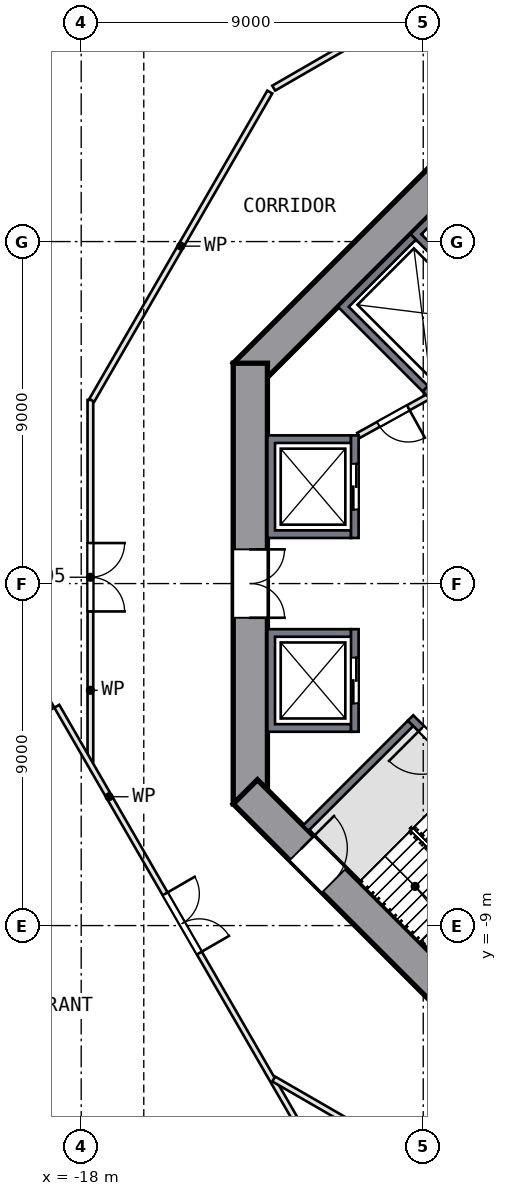
"""IFC4 building model, lengths in metres.
Left out: names, types, materials, properties, quantities, classifications, styles, units other than length and angle.
Written with IfcOpenShell. Run it as: python <this file> out.ifc"""

import sys

from ifc_helpers import new_model, si_unit, direction, frame, frame_2d, origin, place, context, subcontext, project, spatial, polyline, rectangle, outline, extrude, element, fill, save


model = new_model("IFC4")
c1 = context("Model", 3, precision=1e-05, world=origin(), true_north=direction((0.0, 1.0)))
c2 = subcontext(c1, "Body", "Model", "MODEL_VIEW")
j1 = project(units=[si_unit("LENGTHUNIT", "METRE"), si_unit("PLANEANGLEUNIT", "RADIAN")], contexts=[c1])
p1 = place(None, origin())
s1 = spatial("IfcSite", under=j1, at=p1, CompositionType="ELEMENT")
p2 = place(p1, origin())
s2 = spatial("IfcBuilding", under=s1, at=p2, CompositionType="ELEMENT")
p3 = place(p2, frame((0.0, 0.0, 8.0)))
s3 = spatial("IfcBuildingStorey", under=s2, at=p3, CompositionType="ELEMENT", Elevation=8.0)
p4 = place(p3, frame((-5.481, 13.682, 0.0), z_axis=(0.0, 0.0, 1.0), x_axis=(-0.707106781, -0.707106781, 0.0)))
e1 = element("IfcWall", 1, at=p4, inside=s3, PredefinedType="SHEAR", context=c2, shape_type="SweptSolid", body=[
    extrude(rectangle(XDim=11.598, YDim=0.9, at=frame_2d((5.799, 0.0))), origin(), (0.0, 0.0, 1.0), 6.0),
])
p5 = place(p3, frame((-13.55, 5.799, 0.0), z_axis=(0.0, 0.0, 1.0), x_axis=(0.0, -1.0, 0.0)))
e2 = element("IfcWall", 2, at=p5, inside=s3, PredefinedType="SHEAR", context=c2, shape_type="SweptSolid", body=[
    extrude(rectangle(XDim=11.598, YDim=0.9, at=frame_2d((5.799, 0.0))), origin(), (0.0, 0.0, 1.0), 6.0),
])
p6 = place(p5, frame((4.899, 0.0, 0.0)))
e3 = element("IfcOpeningElement", 3, at=p6, cuts=e2, PredefinedType="OPENING", context=c2, shape_type="SweptSolid", body=[
    extrude(rectangle(XDim=1.8, YDim=2.1, at=frame_2d((0.9, 1.05))), frame((0.0, 0.46, 0.0), z_axis=(0.0, -1.0, 0.0), x_axis=(1.0, 0.0, 0.0)), (0.0, 0.0, 1.0), 0.92),
])
p7 = place(p3, frame((-13.682, -5.481, 0.0), z_axis=(0.0, 0.0, 1.0), x_axis=(0.707106781, -0.707106781, 0.0)))
e4 = element("IfcWall", 4, at=p7, inside=s3, PredefinedType="SHEAR", context=c2, shape_type="SweptSolid", body=[
    extrude(rectangle(XDim=11.598, YDim=0.9, at=frame_2d((5.799, 0.0))), origin(), (0.0, 0.0, 1.0), 6.0),
])
p8 = place(p7, frame((2.099, 0.0, 0.0)))
e5 = element("IfcOpeningElement", 5, at=p8, cuts=e4, PredefinedType="OPENING", context=c2, shape_type="SweptSolid", body=[
    extrude(rectangle(XDim=1.2, YDim=2.1, at=frame_2d((0.6, 1.05))), frame((0.0, 0.46, 0.0), z_axis=(0.0, -1.0, 0.0), x_axis=(1.0, 0.0, 0.0)), (0.0, 0.0, 1.0), 0.92),
])
p9 = place(p3, frame((-17.777, 17.586, 0.0), z_axis=(0.0, 0.0, 1.0), x_axis=(-0.500006139, -0.866021859, 0.0)))
e6 = element("IfcWall", 6, at=p9, inside=s3, PredefinedType="SOLIDWALL", context=c2, shape_type="SweptSolid", body=[
    extrude(rectangle(XDim=12.962, YDim=0.14, at=frame_2d((6.481, 0.0))), origin(), (0.0, 0.0, 1.0), 5.55),
])
p10 = place(p9, frame((1.748, 0.0, 0.9)))
e7 = element("IfcOpeningElement", 7, at=p10, cuts=e6, PredefinedType="OPENING", context=c2, shape_type="SweptSolid", body=[
    extrude(rectangle(XDim=3.0, YDim=3.6, at=frame_2d((1.5, 1.8))), frame((0.0, 0.08, 0.0), z_axis=(0.0, -1.0, 0.0), x_axis=(1.0, 0.0, 0.0)), (0.0, 0.0, 1.0), 0.16),
])
p11 = place(p9, frame((7.935, 0.0, 0.9)))
e8 = element("IfcOpeningElement", 8, at=p11, cuts=e6, PredefinedType="OPENING", context=c2, shape_type="SweptSolid", body=[
    extrude(rectangle(XDim=3.0, YDim=3.6, at=frame_2d((1.5, 1.8))), frame((0.0, 0.08, 0.0), z_axis=(0.0, -1.0, 0.0), x_axis=(1.0, 0.0, 0.0)), (0.0, 0.0, 1.0), 0.16),
])
p12 = place(p3, origin())
e9 = element("IfcWall", 9, at=p12, inside=s3, PredefinedType="SOLIDWALL", context=c2, shape_type="SweptSolid", body=[
    extrude(outline(polyline([(-13.1, 3.9), (-10.9, 3.9), (-10.9, 3.7), (-12.9, 3.7), (-12.9, 1.4), (-10.9, 1.4), (-10.9, 1.2), (-13.1, 1.2), (-13.1, 3.9)])), origin(), (0.0, 0.0, 1.0), 5.55),
])
p13 = place(p3, frame((-10.8, 1.2, 0.0), z_axis=(0.0, 0.0, 1.0), x_axis=(0.0, 1.0, 0.0)))
e10 = element("IfcWall", 10, at=p13, inside=s3, PredefinedType="SOLIDWALL", context=c2, shape_type="SweptSolid", body=[
    extrude(rectangle(XDim=2.7, YDim=0.2, at=frame_2d((1.35, 0.0))), origin(), (0.0, 0.0, 1.0), 5.55),
])
p14 = place(p13, frame((0.75, 0.0, 0.0)))
e11 = element("IfcOpeningElement", 11, at=p14, cuts=e10, PredefinedType="OPENING", context=c2, shape_type="SweptSolid", body=[
    extrude(rectangle(XDim=1.2, YDim=2.1, at=frame_2d((0.6, 1.05))), frame((0.0, 0.11, 0.0), z_axis=(0.0, -1.0, 0.0), x_axis=(1.0, 0.0, 0.0)), (0.0, 0.0, 1.0), 0.22),
])
p15 = place(p3, origin())
e12 = element("IfcWall", 12, at=p15, inside=s3, PredefinedType="SOLIDWALL", context=c2, shape_type="SweptSolid", body=[
    extrude(outline(polyline([(-13.1, -3.9), (-13.1, -1.2), (-10.9, -1.2), (-10.9, -1.4), (-12.9, -1.4), (-12.9, -3.7), (-10.9, -3.7), (-10.9, -3.9), (-13.1, -3.9)])), origin(), (0.0, 0.0, 1.0), 5.55),
])
p16 = place(p3, frame((-10.8, -1.2, 0.0), z_axis=(0.0, 0.0, 1.0), x_axis=(0.0, -1.0, 0.0)))
e13 = element("IfcWall", 13, at=p16, inside=s3, PredefinedType="SOLIDWALL", context=c2, shape_type="SweptSolid", body=[
    extrude(rectangle(XDim=2.7, YDim=0.2, at=frame_2d((1.35, 0.0))), origin(), (0.0, 0.0, 1.0), 5.55),
])
p17 = place(p16, frame((0.75, 0.0, 0.0)))
e14 = element("IfcOpeningElement", 14, at=p17, cuts=e13, PredefinedType="OPENING", context=c2, shape_type="SweptSolid", body=[
    extrude(rectangle(XDim=1.2, YDim=2.1, at=frame_2d((0.6, 1.05))), frame((0.0, 0.11, 0.0), z_axis=(0.0, -1.0, 0.0), x_axis=(1.0, 0.0, 0.0)), (0.0, 0.0, 1.0), 0.22),
])
p18 = place(p3, origin())
e15 = element("IfcWall", 15, at=p18, inside=s3, PredefinedType="SOLIDWALL", context=c2, shape_type="SweptSolid", body=[
    extrude(outline(polyline([(-9.334, 9.192), (-7.283, 11.243), (-5.056, 9.016), (-5.197, 8.874), (-7.283, 10.96), (-9.051, 9.192), (-6.965, 7.106), (-7.106, 6.965), (-9.334, 9.192)])), origin(), (0.0, 0.0, 1.0), 5.55),
])
p19 = place(p3, origin())
e16 = element("IfcWall", 16, at=p19, inside=s3, PredefinedType="SOLIDWALL", context=c2, shape_type="SweptSolid", body=[
    extrude(outline(polyline([(-11.243, 7.283), (-9.334, 9.192), (-9.192, 9.051), (-10.96, 7.283), (-8.874, 5.197), (-9.016, 5.056), (-11.243, 7.283)])), origin(), (0.0, 0.0, 1.0), 5.55),
])
p20 = place(p3, frame((-7.036, 6.894, 0.0), z_axis=(0.0, 0.0, 1.0), x_axis=(-0.707106781, -0.707106781, 0.0)))
e17 = element("IfcWall", 17, at=p20, inside=s3, PredefinedType="SOLIDWALL", context=c2, shape_type="SweptSolid", body=[
    extrude(rectangle(XDim=2.7, YDim=0.2, at=frame_2d((1.35, 0.0))), origin(), (0.0, 0.0, 1.0), 5.55),
])
p21 = place(p20, frame((0.65, 0.0, 0.0)))
e18 = element("IfcOpeningElement", 18, at=p21, cuts=e17, PredefinedType="OPENING", context=c2, shape_type="SweptSolid", body=[
    extrude(rectangle(XDim=1.2, YDim=2.1, at=frame_2d((0.6, 1.05))), frame((0.0, 0.11, 0.0), z_axis=(0.0, -1.0, 0.0), x_axis=(1.0, 0.0, 0.0)), (0.0, 0.0, 1.0), 0.22),
])
p22 = place(p3, frame((-3.535, -9.334, 0.0), z_axis=(0.0, 0.0, 1.0), x_axis=(-0.707106781, 0.707106781, 0.0)))
e19 = element("IfcWall", 19, at=p22, inside=s3, PredefinedType="SOLIDWALL", context=c2, shape_type="SweptSolid", body=[
    extrude(rectangle(XDim=8.2, YDim=0.2, at=frame_2d((4.1, 0.0))), origin(), (0.0, 0.0, 1.0), 5.55),
])
p23 = place(p22, frame((6.6, 0.0, 0.0)))
e20 = element("IfcOpeningElement", 20, at=p23, cuts=e19, PredefinedType="OPENING", context=c2, shape_type="SweptSolid", body=[
    extrude(rectangle(XDim=1.2, YDim=2.1, at=frame_2d((0.6, 1.05))), frame((0.0, 0.11, 0.0), z_axis=(0.0, -1.0, 0.0), x_axis=(1.0, 0.0, 0.0)), (0.0, 0.0, 1.0), 0.22),
])
p24 = place(p3, frame((-9.334, -3.677, 0.0), z_axis=(0.0, 0.0, 1.0), x_axis=(-0.707106781, -0.707106781, 0.0)))
e21 = element("IfcWall", 21, at=p24, inside=s3, PredefinedType="SOLIDWALL", context=c2, shape_type="SweptSolid", body=[
    extrude(rectangle(XDim=3.9, YDim=0.2, at=frame_2d((1.95, 0.0))), origin(), (0.0, 0.0, 1.0), 5.55),
])
p25 = place(p3, frame((-8.874, 4.914, 0.0), z_axis=(0.0, 0.0, 1.0), x_axis=(-0.874129705, -0.485692555, 0.0)))
e22 = element("IfcWall", 22, at=p25, inside=s3, PredefinedType="PARTITIONING", context=c2, shape_type="SweptSolid", body=[
    extrude(rectangle(XDim=2.089, YDim=0.15, at=frame_2d((1.044, 0.0))), origin(), (0.0, 0.0, 1.0), 5.55),
])
p26 = place(p25, frame((0.594, 0.0, 0.0)))
e23 = element("IfcOpeningElement", 23, at=p26, cuts=e22, PredefinedType="OPENING", context=c2, shape_type="SweptSolid", body=[
    extrude(rectangle(XDim=0.9, YDim=2.1, at=frame_2d((0.45, 1.05))), frame((0.0, 0.085, 0.0), z_axis=(0.0, -1.0, 0.0), x_axis=(1.0, 0.0, 0.0)), (0.0, 0.0, 1.0), 0.17),
])
p27 = place(p3, frame((-18.744, -3.201, 0.0), z_axis=(0.0, 0.0, 1.0), x_axis=(-0.866027538, -0.499996304, 0.0)))
e24 = element("IfcWall", 24, at=p27, inside=s3, PredefinedType="PARTITIONING", context=c2, shape_type="SweptSolid", body=[
    extrude(rectangle(XDim=5.582, YDim=0.15, at=frame_2d((2.791, 0.0))), origin(), (0.0, 0.0, 1.0), 5.55),
])
p28 = place(p3, frame((-17.758, 4.833, 0.0), z_axis=(0.0, 0.0, 1.0), x_axis=(0.0, -1.0, 0.0)))
e25 = element("IfcWall", 25, at=p28, inside=s3, PredefinedType="PARTITIONING", context=c2, shape_type="SweptSolid", body=[
    extrude(rectangle(XDim=9.517, YDim=0.15, at=frame_2d((4.758, 0.0))), origin(), (0.0, 0.0, 1.0), 5.55),
])
p29 = place(p28, frame((3.767, 0.0, 0.0)))
e26 = element("IfcOpeningElement", 26, at=p29, cuts=e25, PredefinedType="OPENING", context=c2, shape_type="SweptSolid", body=[
    extrude(rectangle(XDim=1.8, YDim=2.1, at=frame_2d((0.9, 1.05))), frame((0.0, 0.085, 0.0), z_axis=(0.0, -1.0, 0.0), x_axis=(1.0, 0.0, 0.0)), (0.0, 0.0, 1.0), 0.17),
])
p30 = place(p3, frame((-17.721, 4.823, 0.0), z_axis=(0.0, 0.0, 1.0), x_axis=(0.499979668, 0.866037142, 0.0)))
e27 = element("IfcWall", 27, at=p30, inside=s3, PredefinedType="PARTITIONING", context=c2, shape_type="SweptSolid", body=[
    extrude(rectangle(XDim=9.367, YDim=0.15, at=frame_2d((4.683, 0.0))), origin(), (0.0, 0.0, 1.0), 5.55),
])
p31 = place(p3, frame((-4.845, 17.708, 0.0), z_axis=(0.0, 0.0, 1.0), x_axis=(-0.866032826, -0.499987144, 0.0)))
e28 = element("IfcWall", 28, at=p31, inside=s3, PredefinedType="PARTITIONING", context=c2, shape_type="SweptSolid", body=[
    extrude(rectangle(XDim=9.342, YDim=0.15, at=frame_2d((4.671, 0.0))), origin(), (0.0, 0.0, 1.0), 5.55),
])
p32 = place(p31, frame((3.792, 0.0, 0.0)))
e29 = element("IfcOpeningElement", 29, at=p32, cuts=e28, PredefinedType="OPENING", context=c2, shape_type="SweptSolid", body=[
    extrude(rectangle(XDim=1.8, YDim=2.1, at=frame_2d((0.9, 1.05))), frame((0.0, 0.085, 0.0), z_axis=(0.0, -1.0, 0.0), x_axis=(1.0, 0.0, 0.0)), (0.0, 0.0, 1.0), 0.17),
])
p33 = place(p3, frame((-18.642, -3.229, 0.0), z_axis=(0.0, 0.0, 1.0), x_axis=(0.499998298, -0.866026387, 0.0)))
e30 = element("IfcWall", 30, at=p33, inside=s3, PredefinedType="PARTITIONING", context=c2, shape_type="SweptSolid", body=[
    extrude(rectangle(XDim=13.05, YDim=0.15, at=frame_2d((6.525, 0.0))), origin(), (0.0, 0.0, 1.0), 5.55),
])
p34 = place(p33, frame((5.7, 0.0, 0.0)))
e31 = element("IfcOpeningElement", 31, at=p34, cuts=e30, PredefinedType="OPENING", context=c2, shape_type="SweptSolid", body=[
    extrude(rectangle(XDim=1.8, YDim=2.1, at=frame_2d((0.9, 1.05))), frame((0.0, 0.085, 0.0), z_axis=(0.0, -1.0, 0.0), x_axis=(1.0, 0.0, 0.0)), (0.0, 0.0, 1.0), 0.17),
])
p35 = place(p3, frame((-12.935, -13.038, 0.0), z_axis=(0.0, 0.0, 1.0), x_axis=(0.866027519, -0.499996337, 0.0)))
e32 = element("IfcWall", 32, at=p35, inside=s3, PredefinedType="PARTITIONING", context=c2, shape_type="SweptSolid", body=[
    extrude(rectangle(XDim=9.517, YDim=0.15, at=frame_2d((4.758, 0.0))), origin(), (0.0, 0.0, 1.0), 5.55),
])
p36 = place(p35, frame((3.767, 0.0, 0.0)))
e33 = element("IfcOpeningElement", 33, at=p36, cuts=e32, PredefinedType="OPENING", context=c2, shape_type="SweptSolid", body=[
    extrude(rectangle(XDim=1.8, YDim=2.1, at=frame_2d((0.9, 1.05))), frame((0.0, 0.085, 0.0), z_axis=(0.0, -1.0, 0.0), x_axis=(1.0, 0.0, 0.0)), (0.0, 0.0, 1.0), 0.17),
])
p37 = place(p10, origin())
e34 = element("IfcWindow", 34, at=p37, inside=s3, PartitioningType="SINGLE_PANEL", PredefinedType="WINDOW", context=c2, shape_type="SweptSolid", body=[
    extrude(rectangle(XDim=3.0, YDim=3.6, at=frame_2d((1.5, 1.8))), frame((0.0, 0.03, 0.0), z_axis=(0.0, -1.0, 0.0), x_axis=(1.0, 0.0, 0.0)), (0.0, 0.0, 1.0), 0.06),
])
fill(e7, e34)
p38 = place(p14, origin())
e35 = element("IfcDoor", 35, at=p38, inside=s3, OperationType="DOUBLE_DOOR_SLIDING", PredefinedType="DOOR", context=c2, shape_type="SweptSolid", body=[
    extrude(rectangle(XDim=1.2, YDim=2.1, at=frame_2d((0.6, 1.05))), frame((0.0, 0.025, 0.0), z_axis=(0.0, -1.0, 0.0), x_axis=(1.0, 0.0, 0.0)), (0.0, 0.0, 1.0), 0.05),
])
fill(e11, e35)
p39 = place(p17, origin())
e36 = element("IfcDoor", 36, at=p39, inside=s3, OperationType="DOUBLE_DOOR_SLIDING", PredefinedType="DOOR", context=c2, shape_type="SweptSolid", body=[
    extrude(rectangle(XDim=1.2, YDim=2.1, at=frame_2d((0.6, 1.05))), frame((0.0, 0.025, 0.0), z_axis=(0.0, -1.0, 0.0), x_axis=(1.0, 0.0, 0.0)), (0.0, 0.0, 1.0), 0.05),
])
fill(e14, e36)
p40 = place(p23, origin())
e37 = element("IfcDoor", 37, at=p40, inside=s3, OperationType="SINGLE_SWING_RIGHT", PredefinedType="DOOR", context=c2, shape_type="SweptSolid", body=[
    extrude(rectangle(XDim=1.2, YDim=2.1, at=frame_2d((0.6, 1.05))), frame((0.0, 0.025, 0.0), z_axis=(0.0, -1.0, 0.0), x_axis=(1.0, 0.0, 0.0)), (0.0, 0.0, 1.0), 0.05),
])
fill(e20, e37)
p41 = place(p6, origin())
e38 = element("IfcDoor", 38, at=p41, inside=s3, OperationType="DOUBLE_DOOR_SINGLE_SWING", PredefinedType="DOOR", context=c2, shape_type="SweptSolid", body=[
    extrude(rectangle(XDim=1.8, YDim=2.1, at=frame_2d((0.9, 1.05))), frame((0.0, 0.025, 0.0), z_axis=(0.0, -1.0, 0.0), x_axis=(1.0, 0.0, 0.0)), (0.0, 0.0, 1.0), 0.05),
])
fill(e3, e38)
p42 = place(p8, origin())
e39 = element("IfcDoor", 39, at=p42, inside=s3, OperationType="SINGLE_SWING_LEFT", PredefinedType="DOOR", context=c2, shape_type="SweptSolid", body=[
    extrude(rectangle(XDim=1.2, YDim=2.1, at=frame_2d((0.6, 1.05))), frame((0.0, 0.025, 0.0), z_axis=(0.0, -1.0, 0.0), x_axis=(1.0, 0.0, 0.0)), (0.0, 0.0, 1.0), 0.05),
])
fill(e5, e39)
p43 = place(p26, origin())
e40 = element("IfcDoor", 40, at=p43, inside=s3, OperationType="SINGLE_SWING_LEFT", PredefinedType="DOOR", context=c2, shape_type="SweptSolid", body=[
    extrude(rectangle(XDim=0.9, YDim=2.1, at=frame_2d((0.45, 1.05))), frame((0.0, 0.025, 0.0), z_axis=(0.0, -1.0, 0.0), x_axis=(1.0, 0.0, 0.0)), (0.0, 0.0, 1.0), 0.05),
])
fill(e23, e40)
p44 = place(p29, origin())
e41 = element("IfcDoor", 41, at=p44, inside=s3, OperationType="DOUBLE_DOOR_SINGLE_SWING", PredefinedType="DOOR", context=c2, shape_type="SweptSolid", body=[
    extrude(rectangle(XDim=1.8, YDim=2.1, at=frame_2d((0.9, 1.05))), frame((0.0, 0.025, 0.0), z_axis=(0.0, -1.0, 0.0), x_axis=(1.0, 0.0, 0.0)), (0.0, 0.0, 1.0), 0.05),
])
fill(e26, e41)
p45 = place(p34, origin())
e42 = element("IfcDoor", 42, at=p45, inside=s3, OperationType="DOUBLE_DOOR_SINGLE_SWING", PredefinedType="DOOR", context=c2, shape_type="SweptSolid", body=[
    extrude(rectangle(XDim=1.8, YDim=2.1, at=frame_2d((0.9, 1.05))), frame((0.0, 0.025, 0.0), z_axis=(0.0, -1.0, 0.0), x_axis=(1.0, 0.0, 0.0)), (0.0, 0.0, 1.0), 0.05),
])
fill(e31, e42)
save(model, sys.argv[1])
